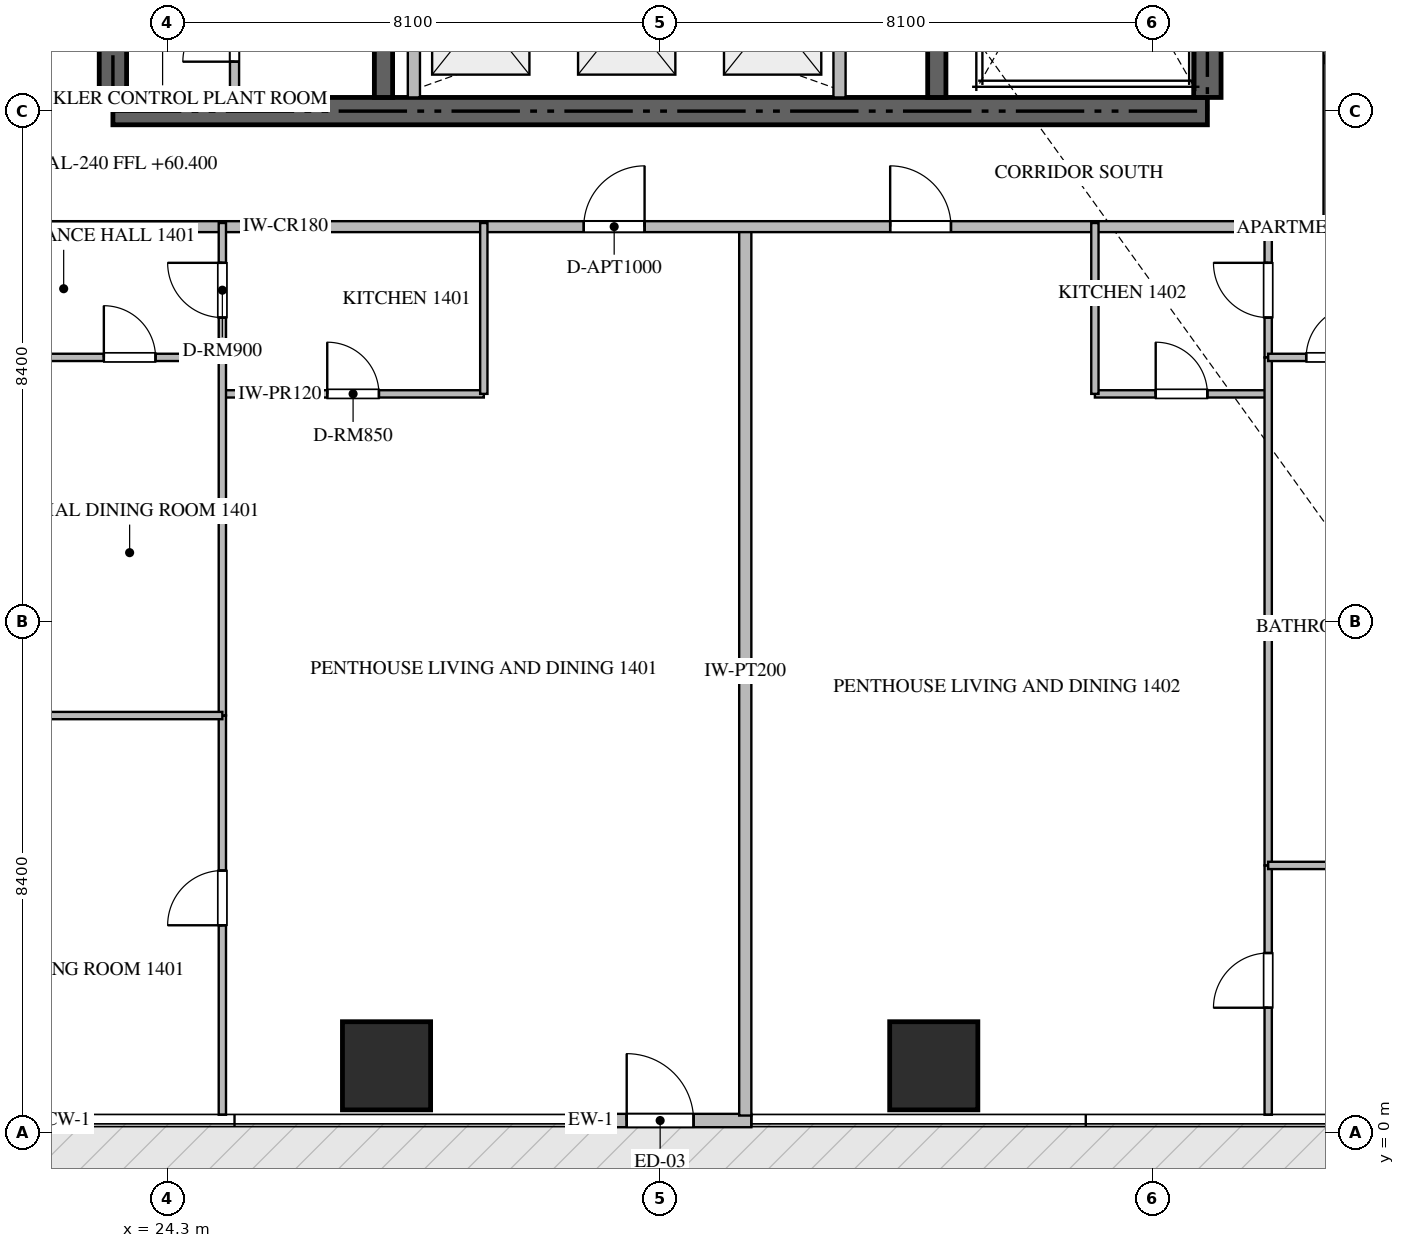
"""IFC4 building model, lengths in metres.
Left out: names, types, materials, properties, quantities, classifications, styles, units other than length and angle.
Written with IfcOpenShell. Run it as: python <this file> out.ifc"""

import sys

from ifc_helpers import new_model, si_unit, direction, frame, frame_2d, origin, origin_2d, place, context, subcontext, project, spatial, rectangle, extrude, source, transform, mapped, element, fill, save


model = new_model("IFC4")
c1 = context("Model", 3, precision=1e-05, world=origin(), true_north=direction((0.0, 1.0)))
c2 = subcontext(c1, "Body", "Model", "MODEL_VIEW")
j1 = project(units=[si_unit("LENGTHUNIT", "METRE"), si_unit("PLANEANGLEUNIT", "RADIAN")], contexts=[c1])
p1 = place(None, origin())
s1 = spatial("IfcSite", under=j1, at=p1, CompositionType="ELEMENT")
p2 = place(p1, origin())
s2 = spatial("IfcBuilding", under=s1, at=p2, CompositionType="ELEMENT")
p3 = place(p2, frame((0.0, 0.0, 60.45)))
s3 = spatial("IfcBuildingStorey", under=s2, at=p3, CompositionType="ELEMENT", Elevation=60.45)
p4 = place(p3, frame((23.4, 16.8, -0.26), z_axis=(0.0, 0.0, 1.0), x_axis=(1.0, 0.0, 0.0)))
e1 = element("IfcWall", 1, at=p4, inside=s3, PredefinedType="SHEAR", context=c2, shape_type="SweptSolid", body=[
    extrude(rectangle(XDim=18.0, YDim=0.45, at=frame_2d((9.0, 0.0))), origin(), (0.0, 0.0, 1.0), 3.748),
])
p5 = place(p3, frame((23.4, 17.025, -0.26), z_axis=(0.0, 0.0, 1.0), x_axis=(0.0, 1.0, 0.0)))
e2 = element("IfcWall", 2, at=p5, inside=s3, PredefinedType="SHEAR", context=c2, shape_type="SweptSolid", body=[
    extrude(rectangle(XDim=4.825, YDim=0.45, at=frame_2d((2.413, 0.0))), origin(), (0.0, 0.0, 1.0), 3.748),
])
p6 = place(p3, frame((41.4, 17.025, -0.26), z_axis=(0.0, 0.0, 1.0), x_axis=(0.0, 1.0, 0.0)))
e3 = element("IfcWall", 3, at=p6, inside=s3, PredefinedType="SHEAR", context=c2, shape_type="SweptSolid", body=[
    extrude(rectangle(XDim=8.325, YDim=0.45, at=frame_2d((4.163, 0.0))), origin(), (0.0, 0.0, 1.0), 3.748),
])
p7 = place(p3, frame((27.85, 17.025, -0.26), z_axis=(0.0, 0.0, 1.0), x_axis=(0.0, 1.0, 0.0)))
e4 = element("IfcWall", 4, at=p7, inside=s3, PredefinedType="SHEAR", context=c2, shape_type="SweptSolid", body=[
    extrude(rectangle(XDim=4.825, YDim=0.3, at=frame_2d((2.413, 0.0))), origin(), (0.0, 0.0, 1.0), 3.748),
])
p8 = place(p3, frame((36.95, 17.025, -0.26), z_axis=(0.0, 0.0, 1.0), x_axis=(0.0, 1.0, 0.0)))
e5 = element("IfcWall", 5, at=p8, inside=s3, PredefinedType="SHEAR", context=c2, shape_type="SweptSolid", body=[
    extrude(rectangle(XDim=8.325, YDim=0.3, at=frame_2d((4.163, 0.0))), origin(), (0.0, 0.0, 1.0), 3.748),
])
m1 = source(origin(), c2, "Body", "SweptSolid", [
    extrude(rectangle(XDim=1.45, YDim=1.45, at=origin_2d()), origin(), (0.0, 0.0, 1.0), 3.75),
])
for number, where, z_axis, x_axis in (
    (6, (27.9, 1.1, -0.26), (0.0, 0.0, 1.0), (1.0, 0.0, 0.0)),
    (7, (36.9, 1.1, -0.26), (0.0, 0.0, 1.0), (1.0, 0.0, 0.0)),
):
    element("IfcColumn", number, at=place(p3, frame(where, z_axis=z_axis, x_axis=x_axis)), inside=s3, PredefinedType="COLUMN", context=c2, shape_type="MappedRepresentation", body=[
        mapped(m1, transform((0.0, 0.0, 0.0), scale=1.0)),
    ])
p9 = place(p3, frame((30.9, 0.2, 0.0), z_axis=(0.0, 0.0, 1.0), x_axis=(1.0, 0.0, 0.0)))
e8 = element("IfcWall", 8, at=p9, inside=s3, PredefinedType="ELEMENTEDWALL", context=c2, shape_type="SweptSolid", body=[
    extrude(rectangle(XDim=3.0, YDim=0.22, at=frame_2d((1.5, 0.0))), origin(), (0.0, 0.0, 1.0), 3.475),
])
p10 = place(p9, frame((0.95, 0.0, 0.0)))
e9 = element("IfcOpeningElement", 9, at=p10, cuts=e8, PredefinedType="OPENING", context=c2, shape_type="SweptSolid", body=[
    extrude(rectangle(XDim=1.1, YDim=2.2, at=frame_2d((0.55, 1.1))), frame((0.0, 0.12, 0.0), z_axis=(0.0, -1.0, 0.0), x_axis=(1.0, 0.0, 0.0)), (0.0, 0.0, 1.0), 0.24),
])
for number, where, z_axis, x_axis in (
    (10, (28.35, 17.025, 0.0), (0.0, 0.0, 1.0), (0.0, 1.0, 0.0)),
    (11, (35.35, 17.025, 0.0), (0.0, 0.0, 1.0), (0.0, 1.0, 0.0)),
):
    element("IfcWall", number, at=place(p3, frame(where, z_axis=z_axis, x_axis=x_axis)), inside=s3, PredefinedType="STANDARD", context=c2, shape_type="SweptSolid", body=[
        extrude(rectangle(XDim=2.525, YDim=0.2, at=frame_2d((1.263, 0.0))), origin(), (0.0, 0.0, 1.0), 3.49),
    ])
p11 = place(p3, frame((25.4, 17.025, 0.0), z_axis=(0.0, 0.0, 1.0), x_axis=(0.0, 1.0, 0.0)))
e12 = element("IfcWall", 12, at=p11, inside=s3, PredefinedType="PARTITIONING", context=c2, shape_type="SweptSolid", body=[
    extrude(rectangle(XDim=2.025, YDim=0.15, at=frame_2d((1.013, 0.0))), origin(), (0.0, 0.0, 1.0), 3.49),
])
p12 = place(p11, frame((0.588, 0.0, 0.0)))
e13 = element("IfcOpeningElement", 13, at=p12, cuts=e12, PredefinedType="OPENING", context=c2, shape_type="SweptSolid", body=[
    extrude(rectangle(XDim=0.85, YDim=2.1, at=frame_2d((0.425, 1.05))), frame((0.0, 0.085, 0.0), z_axis=(0.0, -1.0, 0.0), x_axis=(1.0, 0.0, 0.0)), (0.0, 0.0, 1.0), 0.17),
])
p13 = place(p3, frame((33.8, 0.282, 0.0), z_axis=(0.0, 0.0, 1.0), x_axis=(0.0, 1.0, 0.0)))
e14 = element("IfcWall", 14, at=p13, inside=s3, PredefinedType="PARTITIONING", context=c2, shape_type="SweptSolid", body=[
    extrude(rectangle(XDim=14.618, YDim=0.2, at=frame_2d((7.309, 0.0))), origin(), (0.0, 0.0, 1.0), 3.49),
])
p14 = place(p3, frame((21.402, 14.9, 0.0), z_axis=(0.0, 0.0, 1.0), x_axis=(1.0, 0.0, 0.0)))
e15 = element("IfcWall", 15, at=p14, inside=s3, PredefinedType="PARTITIONING", context=c2, shape_type="SweptSolid", body=[
    extrude(rectangle(XDim=21.996, YDim=0.18, at=frame_2d((10.998, 0.0))), origin(), (0.0, 0.0, 1.0), 3.49),
])
p15 = place(p14, frame((9.742, 0.0, 0.0)))
e16 = element("IfcOpeningElement", 16, at=p15, cuts=e15, PredefinedType="OPENING", context=c2, shape_type="SweptSolid", body=[
    extrude(rectangle(XDim=1.0, YDim=2.15, at=frame_2d((0.5, 1.075))), frame((0.0, 0.1, 0.0), z_axis=(0.0, -1.0, 0.0), x_axis=(1.0, 0.0, 0.0)), (0.0, 0.0, 1.0), 0.2),
])
p16 = place(p14, frame((14.781, 0.0, 0.0)))
e17 = element("IfcOpeningElement", 17, at=p16, cuts=e15, PredefinedType="OPENING", context=c2, shape_type="SweptSolid", body=[
    extrude(rectangle(XDim=1.0, YDim=2.15, at=frame_2d((0.5, 1.075))), frame((0.0, 0.1, 0.0), z_axis=(0.0, -1.0, 0.0), x_axis=(1.0, 0.0, 0.0)), (0.0, 0.0, 1.0), 0.2),
])
p17 = place(p3, frame((43.4, 14.9, 0.0), z_axis=(0.0, 0.0, 1.0), x_axis=(0.0, 1.0, 0.0)))
e18 = element("IfcWall", 18, at=p17, inside=s3, PredefinedType="PARTITIONING", context=c2, shape_type="SweptSolid", body=[
    extrude(rectangle(XDim=20.6, YDim=0.18, at=frame_2d((10.3, 0.0))), origin(), (0.0, 0.0, 1.0), 3.49),
])
p18 = place(p17, frame((5.429, 0.0, 0.0)))
e19 = element("IfcOpeningElement", 19, at=p18, cuts=e18, PredefinedType="OPENING", context=c2, shape_type="SweptSolid", body=[
    extrude(rectangle(XDim=1.0, YDim=2.15, at=frame_2d((0.5, 1.075))), frame((0.0, 0.1, 0.0), z_axis=(0.0, -1.0, 0.0), x_axis=(1.0, 0.0, 0.0)), (0.0, 0.0, 1.0), 0.2),
])
p19 = place(p17, frame((10.506, 0.0, 0.0)))
e20 = element("IfcOpeningElement", 20, at=p19, cuts=e18, PredefinedType="OPENING", context=c2, shape_type="SweptSolid", body=[
    extrude(rectangle(XDim=1.0, YDim=2.15, at=frame_2d((0.5, 1.075))), frame((0.0, 0.1, 0.0), z_axis=(0.0, -1.0, 0.0), x_axis=(1.0, 0.0, 0.0)), (0.0, 0.0, 1.0), 0.2),
])
p20 = place(p3, frame((25.2, 12.15, 0.0), z_axis=(0.0, 0.0, 1.0), x_axis=(1.0, 0.0, 0.0)))
e21 = element("IfcWall", 21, at=p20, inside=s3, PredefinedType="PARTITIONING", context=c2, shape_type="SweptSolid", body=[
    extrude(rectangle(XDim=4.3, YDim=0.12, at=frame_2d((2.15, 0.0))), origin(), (0.0, 0.0, 1.0), 3.49),
])
p21 = place(p20, frame((1.725, 0.0, 0.0)))
e22 = element("IfcOpeningElement", 22, at=p21, cuts=e21, PredefinedType="OPENING", context=c2, shape_type="SweptSolid", body=[
    extrude(rectangle(XDim=0.85, YDim=2.1, at=frame_2d((0.425, 1.05))), frame((0.0, 0.07, 0.0), z_axis=(0.0, -1.0, 0.0), x_axis=(1.0, 0.0, 0.0)), (0.0, 0.0, 1.0), 0.14),
])
p22 = place(p3, frame((29.5, 12.15, 0.0), z_axis=(0.0, 0.0, 1.0), x_axis=(0.0, 1.0, 0.0)))
e23 = element("IfcWall", 23, at=p22, inside=s3, PredefinedType="PARTITIONING", context=c2, shape_type="SweptSolid", body=[
    extrude(rectangle(XDim=2.81, YDim=0.12, at=frame_2d((1.405, 0.0))), origin(), (0.0, 0.0, 1.0), 3.49),
])
p23 = place(p3, frame((25.2, 12.75, 0.0), z_axis=(0.0, 0.0, 1.0), x_axis=(0.0, 1.0, 0.0)))
e24 = element("IfcWall", 24, at=p23, inside=s3, PredefinedType="PARTITIONING", context=c2, shape_type="SweptSolid", body=[
    extrude(rectangle(XDim=2.21, YDim=0.12, at=frame_2d((1.105, 0.0))), origin(), (0.0, 0.0, 1.0), 3.49),
])
p24 = place(p23, frame((0.655, 0.0, 0.0)))
e25 = element("IfcOpeningElement", 25, at=p24, cuts=e24, PredefinedType="OPENING", context=c2, shape_type="SweptSolid", body=[
    extrude(rectangle(XDim=0.9, YDim=2.1, at=frame_2d((0.45, 1.05))), frame((0.0, 0.07, 0.0), z_axis=(0.0, -1.0, 0.0), x_axis=(1.0, 0.0, 0.0)), (0.0, 0.0, 1.0), 0.14),
])
p25 = place(p3, frame((25.2, 0.295, 0.0), z_axis=(0.0, 0.0, 1.0), x_axis=(0.0, 1.0, 0.0)))
e26 = element("IfcWall", 26, at=p25, inside=s3, PredefinedType="PARTITIONING", context=c2, shape_type="SweptSolid", body=[
    extrude(rectangle(XDim=6.565, YDim=0.12, at=frame_2d((3.283, 0.0))), origin(), (0.0, 0.0, 1.0), 3.49),
])
p26 = place(p25, frame((3.116, 0.0, 0.0)))
e27 = element("IfcOpeningElement", 27, at=p26, cuts=e26, PredefinedType="OPENING", context=c2, shape_type="SweptSolid", body=[
    extrude(rectangle(XDim=0.9, YDim=2.1, at=frame_2d((0.45, 1.05))), frame((0.0, 0.07, 0.0), z_axis=(0.0, -1.0, 0.0), x_axis=(1.0, 0.0, 0.0)), (0.0, 0.0, 1.0), 0.14),
])
p27 = place(p3, frame((25.2, 6.862, 0.0), z_axis=(0.0, 0.0, 1.0), x_axis=(0.0, 1.0, 0.0)))
e28 = element("IfcWall", 28, at=p27, inside=s3, PredefinedType="PARTITIONING", context=c2, shape_type="SweptSolid", body=[
    extrude(rectangle(XDim=5.886, YDim=0.12, at=frame_2d((2.943, 0.0))), origin(), (0.0, 0.0, 1.0), 3.49),
])
p28 = place(p3, frame((20.05, 6.86, 0.0), z_axis=(0.0, 0.0, 1.0), x_axis=(1.0, 0.0, 0.0)))
e29 = element("IfcWall", 29, at=p28, inside=s3, PredefinedType="PARTITIONING", context=c2, shape_type="SweptSolid", body=[
    extrude(rectangle(XDim=5.15, YDim=0.12, at=frame_2d((2.575, 0.0))), origin(), (0.0, 0.0, 1.0), 3.49),
])
p29 = place(p3, frame((22.152, 12.75, 0.0), z_axis=(0.0, 0.0, 1.0), x_axis=(1.0, 0.0, 0.0)))
e30 = element("IfcWall", 30, at=p29, inside=s3, PredefinedType="PARTITIONING", context=c2, shape_type="SweptSolid", body=[
    extrude(rectangle(XDim=3.048, YDim=0.12, at=frame_2d((1.524, 0.0))), origin(), (0.0, 0.0, 1.0), 3.49),
])
p30 = place(p29, frame((1.099, 0.0, 0.0)))
e31 = element("IfcOpeningElement", 31, at=p30, cuts=e30, PredefinedType="OPENING", context=c2, shape_type="SweptSolid", body=[
    extrude(rectangle(XDim=0.85, YDim=2.1, at=frame_2d((0.425, 1.05))), frame((0.0, 0.07, 0.0), z_axis=(0.0, -1.0, 0.0), x_axis=(1.0, 0.0, 0.0)), (0.0, 0.0, 1.0), 0.14),
])
p31 = place(p3, frame((39.55, 12.15, 0.0), z_axis=(0.0, 0.0, 1.0), x_axis=(1.0, 0.0, 0.0)))
e32 = element("IfcWall", 32, at=p31, inside=s3, PredefinedType="PARTITIONING", context=c2, shape_type="SweptSolid", body=[
    extrude(rectangle(XDim=2.85, YDim=0.12, at=frame_2d((1.425, 0.0))), origin(), (0.0, 0.0, 1.0), 3.49),
])
p32 = place(p31, frame((1.0, 0.0, 0.0)))
e33 = element("IfcOpeningElement", 33, at=p32, cuts=e32, PredefinedType="OPENING", context=c2, shape_type="SweptSolid", body=[
    extrude(rectangle(XDim=0.85, YDim=2.1, at=frame_2d((0.425, 1.05))), frame((0.0, 0.07, 0.0), z_axis=(0.0, -1.0, 0.0), x_axis=(1.0, 0.0, 0.0)), (0.0, 0.0, 1.0), 0.14),
])
p33 = place(p3, frame((39.55, 12.15, 0.0), z_axis=(0.0, 0.0, 1.0), x_axis=(0.0, 1.0, 0.0)))
e34 = element("IfcWall", 34, at=p33, inside=s3, PredefinedType="PARTITIONING", context=c2, shape_type="SweptSolid", body=[
    extrude(rectangle(XDim=2.81, YDim=0.12, at=frame_2d((1.405, 0.0))), origin(), (0.0, 0.0, 1.0), 3.49),
])
p34 = place(p3, frame((42.4, 12.75, 0.0), z_axis=(0.0, 0.0, 1.0), x_axis=(0.0, 1.0, 0.0)))
e35 = element("IfcWall", 35, at=p34, inside=s3, PredefinedType="PARTITIONING", context=c2, shape_type="SweptSolid", body=[
    extrude(rectangle(XDim=2.21, YDim=0.12, at=frame_2d((1.105, 0.0))), origin(), (0.0, 0.0, 1.0), 3.49),
])
p35 = place(p34, frame((0.655, 0.0, 0.0)))
e36 = element("IfcOpeningElement", 36, at=p35, cuts=e35, PredefinedType="OPENING", context=c2, shape_type="SweptSolid", body=[
    extrude(rectangle(XDim=0.9, YDim=2.1, at=frame_2d((0.45, 1.05))), frame((0.0, 0.07, 0.0), z_axis=(0.0, -1.0, 0.0), x_axis=(1.0, 0.0, 0.0)), (0.0, 0.0, 1.0), 0.14),
])
p36 = place(p3, frame((42.4, 0.295, 0.0), z_axis=(0.0, 0.0, 1.0), x_axis=(0.0, 1.0, 0.0)))
e37 = element("IfcWall", 37, at=p36, inside=s3, PredefinedType="PARTITIONING", context=c2, shape_type="SweptSolid", body=[
    extrude(rectangle(XDim=4.1, YDim=0.12, at=frame_2d((2.05, 0.0))), origin(), (0.0, 0.0, 1.0), 3.49),
])
p37 = place(p36, frame((1.76, 0.0, 0.0)))
e38 = element("IfcOpeningElement", 38, at=p37, cuts=e37, PredefinedType="OPENING", context=c2, shape_type="SweptSolid", body=[
    extrude(rectangle(XDim=0.9, YDim=2.1, at=frame_2d((0.45, 1.05))), frame((0.0, 0.07, 0.0), z_axis=(0.0, -1.0, 0.0), x_axis=(1.0, 0.0, 0.0)), (0.0, 0.0, 1.0), 0.14),
])
p38 = place(p3, frame((42.4, 4.397, 0.0), z_axis=(0.0, 0.0, 1.0), x_axis=(0.0, 1.0, 0.0)))
e39 = element("IfcWall", 39, at=p38, inside=s3, PredefinedType="PARTITIONING", context=c2, shape_type="SweptSolid", body=[
    extrude(rectangle(XDim=8.351, YDim=0.12, at=frame_2d((4.176, 0.0))), origin(), (0.0, 0.0, 1.0), 3.49),
])
p39 = place(p3, frame((42.4, 4.395, 0.0), z_axis=(0.0, 0.0, 1.0), x_axis=(1.0, 0.0, 0.0)))
e40 = element("IfcWall", 40, at=p39, inside=s3, PredefinedType="PARTITIONING", context=c2, shape_type="SweptSolid", body=[
    extrude(rectangle(XDim=5.15, YDim=0.12, at=frame_2d((2.575, 0.0))), origin(), (0.0, 0.0, 1.0), 3.49),
])
p40 = place(p3, frame((42.4, 12.75, 0.0), z_axis=(0.0, 0.0, 1.0), x_axis=(1.0, 0.0, 0.0)))
e41 = element("IfcWall", 41, at=p40, inside=s3, PredefinedType="PARTITIONING", context=c2, shape_type="SweptSolid", body=[
    extrude(rectangle(XDim=2.1, YDim=0.12, at=frame_2d((1.05, 0.0))), origin(), (0.0, 0.0, 1.0), 3.49),
])
p41 = place(p40, frame((0.625, 0.0, 0.0)))
e42 = element("IfcOpeningElement", 42, at=p41, cuts=e41, PredefinedType="OPENING", context=c2, shape_type="SweptSolid", body=[
    extrude(rectangle(XDim=0.85, YDim=2.1, at=frame_2d((0.425, 1.05))), frame((0.0, 0.07, 0.0), z_axis=(0.0, -1.0, 0.0), x_axis=(1.0, 0.0, 0.0)), (0.0, 0.0, 1.0), 0.14),
])
p42 = place(p3, frame((45.948, 17.65, 0.0), z_axis=(0.0, 0.0, 1.0), x_axis=(-1.0, 0.0, 0.0)))
e43 = element("IfcWall", 43, at=p42, inside=s3, PredefinedType="PARTITIONING", context=c2, shape_type="SweptSolid", body=[
    extrude(rectangle(XDim=2.608, YDim=0.12, at=frame_2d((1.304, 0.0))), origin(), (0.0, 0.0, 1.0), 3.49),
])
p43 = place(p42, frame((0.879, 0.0, 0.0)))
e44 = element("IfcOpeningElement", 44, at=p43, cuts=e43, PredefinedType="OPENING", context=c2, shape_type="SweptSolid", body=[
    extrude(rectangle(XDim=0.85, YDim=2.1, at=frame_2d((0.425, 1.05))), frame((0.0, 0.07, 0.0), z_axis=(0.0, -1.0, 0.0), x_axis=(1.0, 0.0, 0.0)), (0.0, 0.0, 1.0), 0.14),
])
m2 = source(origin(), c2, "Body", "SweptSolid", [
    extrude(rectangle(XDim=1.1, YDim=2.2, at=frame_2d((0.55, 1.1))), frame((0.0, 0.025, 0.0), z_axis=(0.0, -1.0, 0.0), x_axis=(1.0, 0.0, 0.0)), (0.0, 0.0, 1.0), 0.05),
])
p44 = place(p10, origin())
e45 = element("IfcDoor", 45, at=p44, inside=s3, OperationType="SINGLE_SWING_LEFT", PredefinedType="DOOR", context=c2, shape_type="MappedRepresentation", body=[
    mapped(m2, transform((0.0, 0.0, 0.0), scale=1.0)),
])
fill(e9, e45)
m3 = source(origin(), c2, "Body", "SweptSolid", [
    extrude(rectangle(XDim=0.85, YDim=2.1, at=frame_2d((0.425, 1.05))), frame((0.0, 0.025, 0.0), z_axis=(0.0, -1.0, 0.0), x_axis=(1.0, 0.0, 0.0)), (0.0, 0.0, 1.0), 0.05),
])
p45 = place(p12, origin())
e46 = element("IfcDoor", 46, at=p45, inside=s3, OperationType="SINGLE_SWING_LEFT", PredefinedType="DOOR", context=c2, shape_type="MappedRepresentation", body=[
    mapped(m3, transform((0.0, 0.0, 0.0), scale=1.0)),
])
fill(e13, e46)
m4 = source(origin(), c2, "Body", "SweptSolid", [
    extrude(rectangle(XDim=1.0, YDim=2.15, at=frame_2d((0.5, 1.075))), frame((0.0, 0.025, 0.0), z_axis=(0.0, -1.0, 0.0), x_axis=(1.0, 0.0, 0.0)), (0.0, 0.0, 1.0), 0.05),
])
p46 = place(p15, origin())
e47 = element("IfcDoor", 47, at=p46, inside=s3, OperationType="SINGLE_SWING_RIGHT", PredefinedType="DOOR", context=c2, shape_type="MappedRepresentation", body=[
    mapped(m4, transform((0.0, 0.0, 0.0), scale=1.0)),
])
fill(e16, e47)
p47 = place(p16, origin())
e48 = element("IfcDoor", 48, at=p47, inside=s3, OperationType="SINGLE_SWING_LEFT", PredefinedType="DOOR", context=c2, shape_type="MappedRepresentation", body=[
    mapped(m4, transform((0.0, 0.0, 0.0), scale=1.0)),
])
fill(e17, e48)
p48 = place(p21, origin())
e49 = element("IfcDoor", 49, at=p48, inside=s3, OperationType="SINGLE_SWING_LEFT", PredefinedType="DOOR", context=c2, shape_type="MappedRepresentation", body=[
    mapped(m3, transform((0.0, 0.0, 0.0), scale=1.0)),
])
fill(e22, e49)
m5 = source(origin(), c2, "Body", "SweptSolid", [
    extrude(rectangle(XDim=0.9, YDim=2.1, at=frame_2d((0.45, 1.05))), frame((0.0, 0.025, 0.0), z_axis=(0.0, -1.0, 0.0), x_axis=(1.0, 0.0, 0.0)), (0.0, 0.0, 1.0), 0.05),
])
p49 = place(p24, origin())
e50 = element("IfcDoor", 50, at=p49, inside=s3, OperationType="SINGLE_SWING_RIGHT", PredefinedType="DOOR", context=c2, shape_type="MappedRepresentation", body=[
    mapped(m5, transform((0.0, 0.0, 0.0), scale=1.0)),
])
fill(e25, e50)
p50 = place(p26, origin())
e51 = element("IfcDoor", 51, at=p50, inside=s3, OperationType="SINGLE_SWING_LEFT", PredefinedType="DOOR", context=c2, shape_type="MappedRepresentation", body=[
    mapped(m5, transform((0.0, 0.0, 0.0), scale=1.0)),
])
fill(e27, e51)
p51 = place(p30, origin())
e52 = element("IfcDoor", 52, at=p51, inside=s3, OperationType="SINGLE_SWING_LEFT", PredefinedType="DOOR", context=c2, shape_type="MappedRepresentation", body=[
    mapped(m3, transform((0.0, 0.0, 0.0), scale=1.0)),
])
fill(e31, e52)
p52 = place(p32, origin())
e53 = element("IfcDoor", 53, at=p52, inside=s3, OperationType="SINGLE_SWING_LEFT", PredefinedType="DOOR", context=c2, shape_type="MappedRepresentation", body=[
    mapped(m3, transform((0.0, 0.0, 0.0), scale=1.0)),
])
fill(e33, e53)
p53 = place(p35, origin())
e54 = element("IfcDoor", 54, at=p53, inside=s3, OperationType="SINGLE_SWING_RIGHT", PredefinedType="DOOR", context=c2, shape_type="MappedRepresentation", body=[
    mapped(m5, transform((0.0, 0.0, 0.0), scale=1.0)),
])
fill(e36, e54)
p54 = place(p37, origin())
e55 = element("IfcDoor", 55, at=p54, inside=s3, OperationType="SINGLE_SWING_LEFT", PredefinedType="DOOR", context=c2, shape_type="MappedRepresentation", body=[
    mapped(m5, transform((0.0, 0.0, 0.0), scale=1.0)),
])
fill(e38, e55)
p55 = place(p41, origin())
e56 = element("IfcDoor", 56, at=p55, inside=s3, OperationType="SINGLE_SWING_RIGHT", PredefinedType="DOOR", context=c2, shape_type="MappedRepresentation", body=[
    mapped(m3, transform((0.0, 0.0, 0.0), scale=1.0)),
])
fill(e42, e56)
save(model, sys.argv[1])
